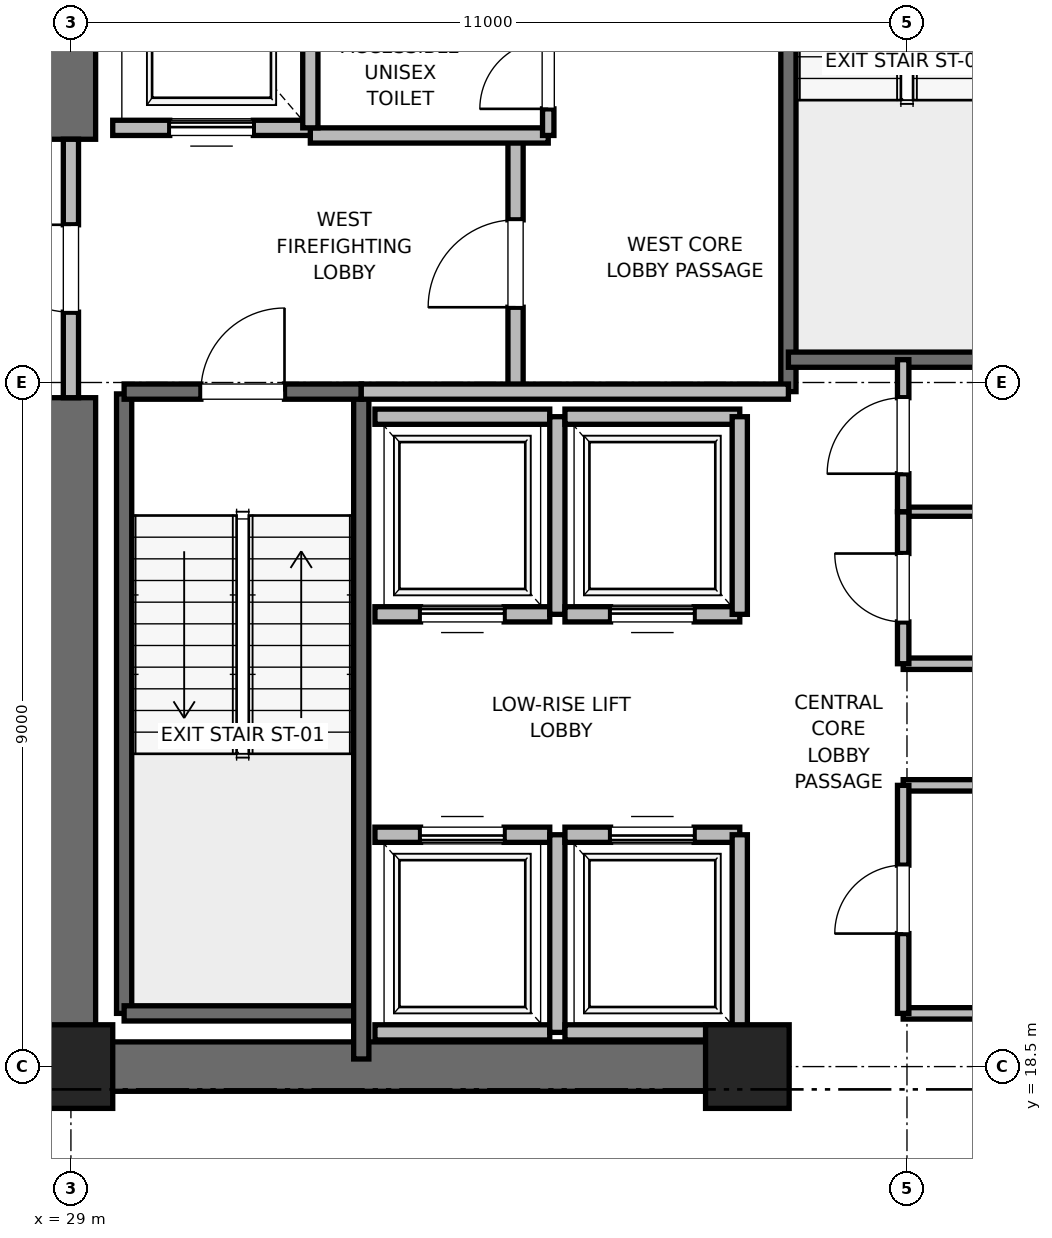
"""IFC4 building model, lengths in metres.
Left out: names, types, materials, properties, quantities, classifications, styles, units other than length and angle.
Written with IfcOpenShell. Run it as: python <this file> out.ifc"""

import sys

from ifc_helpers import new_model, si_unit, direction, frame, frame_2d, origin, origin_2d, place, context, subcontext, project, spatial, rectangle, extrude, element, fill, save


model = new_model("IFC4")
c1 = context("Model", 3, precision=1e-05, world=origin(), true_north=direction((0.0, 1.0)))
c2 = subcontext(c1, "Body", "Model", "MODEL_VIEW")
j1 = project(units=[si_unit("LENGTHUNIT", "METRE"), si_unit("PLANEANGLEUNIT", "RADIAN")], contexts=[c1])
p1 = place(None, origin())
s1 = spatial("IfcSite", under=j1, at=p1, CompositionType="ELEMENT")
p2 = place(p1, origin())
s2 = spatial("IfcBuilding", under=s1, at=p2, CompositionType="ELEMENT")
p3 = place(p2, frame((0.0, 0.0, 27.6)))
s3 = spatial("IfcBuildingStorey", under=s2, at=p3, CompositionType="ELEMENT", Elevation=27.6)
for number, where, z_axis, x_axis in (
    (1, (29.0, 18.5, 0.0), (0.0, 0.0, 1.0), (1.0, 0.0, 0.0)),
    (2, (37.9, 18.5, 0.0), (0.0, 0.0, 1.0), (1.0, 0.0, 0.0)),
):
    element("IfcColumn", number, at=place(p3, frame(where, z_axis=z_axis, x_axis=x_axis)), inside=s3, PredefinedType="PILASTER", context=c2, shape_type="SweptSolid", body=[
        extrude(rectangle(XDim=1.1, YDim=1.1, at=origin_2d()), origin(), (0.0, 0.0, 1.0), 4.0),
    ])
p4 = place(p3, frame((29.0, 18.5, 0.0), z_axis=(0.0, 0.0, 1.0), x_axis=(1.0, 0.0, 0.0)))
e3 = element("IfcWall", 3, at=p4, inside=s3, PredefinedType="SHEAR", context=c2, shape_type="SweptSolid", body=[
    extrude(rectangle(XDim=9.2, YDim=0.65, at=frame_2d((4.6, 0.0))), origin(), (0.0, 0.0, 1.0), 3.76),
])
p5 = place(p3, frame((29.0, 18.5, 0.0), z_axis=(0.0, 0.0, 1.0), x_axis=(0.0, 1.0, 0.0)))
e4 = element("IfcWall", 4, at=p5, inside=s3, PredefinedType="SHEAR", context=c2, shape_type="SweptSolid", body=[
    extrude(rectangle(XDim=8.8, YDim=0.65, at=frame_2d((4.4, 0.0))), origin(), (0.0, 0.0, 1.0), 3.76),
])
p6 = place(p3, frame((29.0, 30.7, 0.0), z_axis=(0.0, 0.0, 1.0), x_axis=(0.0, 1.0, 0.0)))
e5 = element("IfcWall", 5, at=p6, inside=s3, PredefinedType="SHEAR", context=c2, shape_type="SweptSolid", body=[
    extrude(rectangle(XDim=5.8, YDim=0.65, at=frame_2d((2.9, 0.0))), origin(), (0.0, 0.0, 1.0), 3.76),
])
p7 = place(p3, frame((29.7, 19.2, 0.0), z_axis=(0.0, 0.0, 1.0), x_axis=(0.0, 1.0, 0.0)))
e6 = element("IfcWall", 6, at=p7, inside=s3, PredefinedType="SOLIDWALL", context=c2, shape_type="SweptSolid", body=[
    extrude(rectangle(XDim=8.15, YDim=0.2, at=frame_2d((4.075, 0.0))), origin(), (0.0, 0.0, 1.0), 3.76),
])
p8 = place(p3, frame((29.7, 19.2, 0.0), z_axis=(0.0, 0.0, 1.0), x_axis=(1.0, 0.0, 0.0)))
e7 = element("IfcWall", 7, at=p8, inside=s3, PredefinedType="SOLIDWALL", context=c2, shape_type="SweptSolid", body=[
    extrude(rectangle(XDim=3.12, YDim=0.2, at=frame_2d((1.56, 0.0))), origin(), (0.0, 0.0, 1.0), 3.76),
])
p9 = place(p3, frame((32.82, 18.6, 0.0), z_axis=(0.0, 0.0, 1.0), x_axis=(0.0, 1.0, 0.0)))
e8 = element("IfcWall", 8, at=p9, inside=s3, PredefinedType="SOLIDWALL", context=c2, shape_type="SweptSolid", body=[
    extrude(rectangle(XDim=8.78, YDim=0.2, at=frame_2d((4.39, 0.0))), origin(), (0.0, 0.0, 1.0), 3.76),
])
p10 = place(p3, frame((29.7, 27.38, 0.0), z_axis=(0.0, 0.0, 1.0), x_axis=(1.0, 0.0, 0.0)))
e9 = element("IfcWall", 9, at=p10, inside=s3, PredefinedType="SOLIDWALL", context=c2, shape_type="SweptSolid", body=[
    extrude(rectangle(XDim=3.12, YDim=0.2, at=frame_2d((1.56, 0.0))), origin(), (0.0, 0.0, 1.0), 3.76),
])
p11 = place(p10, frame((1.01, 0.0, 0.0)))
e10 = element("IfcOpeningElement", 10, at=p11, cuts=e9, PredefinedType="OPENING", context=c2, shape_type="SweptSolid", body=[
    extrude(rectangle(XDim=1.1, YDim=2.15, at=frame_2d((0.55, 1.075))), frame((0.0, 0.1, 0.0), z_axis=(0.0, -1.0, 0.0), x_axis=(1.0, 0.0, 0.0)), (0.0, 0.0, 1.0), 0.2),
])
p12 = place(p3, frame((38.44, 27.38, 0.0), z_axis=(0.0, 0.0, 1.0), x_axis=(0.0, 1.0, 0.0)))
e11 = element("IfcWall", 11, at=p12, inside=s3, PredefinedType="SOLIDWALL", context=c2, shape_type="SweptSolid", body=[
    extrude(rectangle(XDim=8.87, YDim=0.2, at=frame_2d((4.435, 0.0))), origin(), (0.0, 0.0, 1.0), 3.76),
])
p13 = place(p3, frame((38.44, 27.8, 0.0), z_axis=(0.0, 0.0, 1.0), x_axis=(1.0, 0.0, 0.0)))
e12 = element("IfcWall", 12, at=p13, inside=s3, PredefinedType="SOLIDWALL", context=c2, shape_type="SweptSolid", body=[
    extrude(rectangle(XDim=3.32, YDim=0.2, at=frame_2d((1.66, 0.0))), origin(), (0.0, 0.0, 1.0), 3.76),
])
p14 = place(p3, frame((34.85, 27.38, 0.0), z_axis=(0.0, 0.0, 1.0), x_axis=(0.0, 1.0, 0.0)))
e13 = element("IfcWall", 13, at=p14, inside=s3, PredefinedType="PARTITIONING", context=c2, shape_type="SweptSolid", body=[
    extrude(rectangle(XDim=3.37, YDim=0.2, at=frame_2d((1.685, 0.0))), origin(), (0.0, 0.0, 1.0), 3.76),
])
p15 = place(p14, frame((1.11, 0.0, 0.0)))
e14 = element("IfcOpeningElement", 14, at=p15, cuts=e13, PredefinedType="OPENING", context=c2, shape_type="SweptSolid", body=[
    extrude(rectangle(XDim=1.15, YDim=2.2, at=frame_2d((0.575, 1.1))), frame((0.0, 0.1, 0.0), z_axis=(0.0, -1.0, 0.0), x_axis=(1.0, 0.0, 0.0)), (0.0, 0.0, 1.0), 0.2),
])
p16 = place(p3, frame((29.0, 27.3, 0.0), z_axis=(0.0, 0.0, 1.0), x_axis=(0.0, 1.0, 0.0)))
e15 = element("IfcWall", 15, at=p16, inside=s3, PredefinedType="PARTITIONING", context=c2, shape_type="SweptSolid", body=[
    extrude(rectangle(XDim=3.4, YDim=0.2, at=frame_2d((1.7, 0.0))), origin(), (0.0, 0.0, 1.0), 2.54),
])
p17 = place(p16, frame((1.125, 0.0, 0.0)))
e16 = element("IfcOpeningElement", 16, at=p17, cuts=e15, PredefinedType="OPENING", context=c2, shape_type="SweptSolid", body=[
    extrude(rectangle(XDim=1.15, YDim=2.2, at=frame_2d((0.575, 1.1))), frame((0.0, 0.1, 0.0), z_axis=(0.0, -1.0, 0.0), x_axis=(1.0, 0.0, 0.0)), (0.0, 0.0, 1.0), 0.2),
])
p18 = place(p3, frame((32.82, 27.38, 0.0), z_axis=(0.0, 0.0, 1.0), x_axis=(1.0, 0.0, 0.0)))
e17 = element("IfcWall", 17, at=p18, inside=s3, PredefinedType="PARTITIONING", context=c2, shape_type="SweptSolid", body=[
    extrude(rectangle(XDim=5.62, YDim=0.2, at=frame_2d((2.81, 0.0))), origin(), (0.0, 0.0, 1.0), 3.76),
])
p19 = place(p3, frame((32.15, 30.75, 0.0), z_axis=(0.0, 0.0, 1.0), x_axis=(1.0, 0.0, 0.0)))
e18 = element("IfcWall", 18, at=p19, inside=s3, PredefinedType="PARTITIONING", context=c2, shape_type="SweptSolid", body=[
    extrude(rectangle(XDim=3.13, YDim=0.2, at=frame_2d((1.565, 0.0))), origin(), (0.0, 0.0, 1.0), 3.76),
])
p20 = place(p3, frame((29.55, 30.85, 0.0), z_axis=(0.0, 0.0, 1.0), x_axis=(1.0, 0.0, 0.0)))
e19 = element("IfcWall", 19, at=p20, inside=s3, PredefinedType="SOLIDWALL", context=c2, shape_type="SweptSolid", body=[
    extrude(rectangle(XDim=2.6, YDim=0.2, at=frame_2d((1.3, 0.0))), origin(), (0.0, 0.0, 1.0), 2.54),
])
p21 = place(p20, frame((0.75, 0.0, 0.0)))
e20 = element("IfcOpeningElement", 20, at=p21, cuts=e19, PredefinedType="OPENING", context=c2, shape_type="SweptSolid", body=[
    extrude(rectangle(XDim=1.1, YDim=2.2, at=frame_2d((0.55, 1.1))), frame((0.0, 0.1, 0.0), z_axis=(0.0, -1.0, 0.0), x_axis=(1.0, 0.0, 0.0)), (0.0, 0.0, 1.0), 0.2),
])
p22 = place(p3, frame((32.15, 30.85, 0.0), z_axis=(0.0, 0.0, 1.0), x_axis=(0.0, 1.0, 0.0)))
e21 = element("IfcWall", 21, at=p22, inside=s3, PredefinedType="SOLIDWALL", context=c2, shape_type="SweptSolid", body=[
    extrude(rectangle(XDim=3.0, YDim=0.2, at=frame_2d((1.5, 0.0))), origin(), (0.0, 0.0, 1.0), 3.76),
])
p23 = place(p3, frame((33.0, 18.95, 0.0), z_axis=(0.0, 0.0, 1.0), x_axis=(1.0, 0.0, 0.0)))
e22 = element("IfcWall", 22, at=p23, inside=s3, PredefinedType="SOLIDWALL", context=c2, shape_type="SweptSolid", body=[
    extrude(rectangle(XDim=2.3, YDim=0.2, at=frame_2d((1.15, 0.0))), origin(), (0.0, 0.0, 1.0), 3.76),
])
p24 = place(p3, frame((35.3, 21.55, 0.0), z_axis=(0.0, 0.0, 1.0), x_axis=(-1.0, 0.0, 0.0)))
e23 = element("IfcWall", 23, at=p24, inside=s3, PredefinedType="SOLIDWALL", context=c2, shape_type="SweptSolid", body=[
    extrude(rectangle(XDim=2.3, YDim=0.2, at=frame_2d((1.15, 0.0))), origin(), (0.0, 0.0, 1.0), 3.76),
])
p25 = place(p24, frame((0.6, 0.0, 0.0)))
e24 = element("IfcOpeningElement", 24, at=p25, cuts=e23, PredefinedType="OPENING", context=c2, shape_type="SweptSolid", body=[
    extrude(rectangle(XDim=1.1, YDim=2.2, at=frame_2d((0.55, 1.1))), frame((0.0, 0.1, 0.0), z_axis=(0.0, -1.0, 0.0), x_axis=(1.0, 0.0, 0.0)), (0.0, 0.0, 1.0), 0.2),
])
p26 = place(p3, frame((35.4, 18.95, 0.0), z_axis=(0.0, 0.0, 1.0), x_axis=(0.0, 1.0, 0.0)))
e25 = element("IfcWall", 25, at=p26, inside=s3, PredefinedType="SOLIDWALL", context=c2, shape_type="SweptSolid", body=[
    extrude(rectangle(XDim=2.6, YDim=0.2, at=frame_2d((1.3, 0.0))), origin(), (0.0, 0.0, 1.0), 3.76),
])
p27 = place(p3, frame((35.5, 18.95, 0.0), z_axis=(0.0, 0.0, 1.0), x_axis=(1.0, 0.0, 0.0)))
e26 = element("IfcWall", 26, at=p27, inside=s3, PredefinedType="SOLIDWALL", context=c2, shape_type="SweptSolid", body=[
    extrude(rectangle(XDim=2.3, YDim=0.2, at=frame_2d((1.15, 0.0))), origin(), (0.0, 0.0, 1.0), 2.54),
])
p28 = place(p3, frame((37.8, 21.55, 0.0), z_axis=(0.0, 0.0, 1.0), x_axis=(-1.0, 0.0, 0.0)))
e27 = element("IfcWall", 27, at=p28, inside=s3, PredefinedType="SOLIDWALL", context=c2, shape_type="SweptSolid", body=[
    extrude(rectangle(XDim=2.3, YDim=0.2, at=frame_2d((1.15, 0.0))), origin(), (0.0, 0.0, 1.0), 3.76),
])
p29 = place(p28, frame((0.6, 0.0, 0.0)))
e28 = element("IfcOpeningElement", 28, at=p29, cuts=e27, PredefinedType="OPENING", context=c2, shape_type="SweptSolid", body=[
    extrude(rectangle(XDim=1.1, YDim=2.2, at=frame_2d((0.55, 1.1))), frame((0.0, 0.1, 0.0), z_axis=(0.0, -1.0, 0.0), x_axis=(1.0, 0.0, 0.0)), (0.0, 0.0, 1.0), 0.2),
])
p30 = place(p3, frame((37.8, 18.95, 0.0), z_axis=(0.0, 0.0, 1.0), x_axis=(0.0, 1.0, 0.0)))
e29 = element("IfcWall", 29, at=p30, inside=s3, PredefinedType="SOLIDWALL", context=c2, shape_type="SweptSolid", body=[
    extrude(rectangle(XDim=2.6, YDim=0.2, at=frame_2d((1.3, 0.0))), origin(), (0.0, 0.0, 1.0), 2.54),
])
p31 = place(p3, frame((33.0, 24.45, 0.0), z_axis=(0.0, 0.0, 1.0), x_axis=(1.0, 0.0, 0.0)))
e30 = element("IfcWall", 30, at=p31, inside=s3, PredefinedType="SOLIDWALL", context=c2, shape_type="SweptSolid", body=[
    extrude(rectangle(XDim=2.3, YDim=0.2, at=frame_2d((1.15, 0.0))), origin(), (0.0, 0.0, 1.0), 3.76),
])
p32 = place(p31, frame((0.6, 0.0, 0.0)))
e31 = element("IfcOpeningElement", 31, at=p32, cuts=e30, PredefinedType="OPENING", context=c2, shape_type="SweptSolid", body=[
    extrude(rectangle(XDim=1.1, YDim=2.2, at=frame_2d((0.55, 1.1))), frame((0.0, 0.1, 0.0), z_axis=(0.0, -1.0, 0.0), x_axis=(1.0, 0.0, 0.0)), (0.0, 0.0, 1.0), 0.2),
])
p33 = place(p3, frame((35.3, 27.05, 0.0), z_axis=(0.0, 0.0, 1.0), x_axis=(-1.0, 0.0, 0.0)))
e32 = element("IfcWall", 32, at=p33, inside=s3, PredefinedType="SOLIDWALL", context=c2, shape_type="SweptSolid", body=[
    extrude(rectangle(XDim=2.3, YDim=0.2, at=frame_2d((1.15, 0.0))), origin(), (0.0, 0.0, 1.0), 3.76),
])
p34 = place(p3, frame((35.4, 24.45, 0.0), z_axis=(0.0, 0.0, 1.0), x_axis=(0.0, 1.0, 0.0)))
e33 = element("IfcWall", 33, at=p34, inside=s3, PredefinedType="SOLIDWALL", context=c2, shape_type="SweptSolid", body=[
    extrude(rectangle(XDim=2.6, YDim=0.2, at=frame_2d((1.3, 0.0))), origin(), (0.0, 0.0, 1.0), 3.76),
])
p35 = place(p3, frame((35.5, 24.45, 0.0), z_axis=(0.0, 0.0, 1.0), x_axis=(1.0, 0.0, 0.0)))
e34 = element("IfcWall", 34, at=p35, inside=s3, PredefinedType="SOLIDWALL", context=c2, shape_type="SweptSolid", body=[
    extrude(rectangle(XDim=2.3, YDim=0.2, at=frame_2d((1.15, 0.0))), origin(), (0.0, 0.0, 1.0), 3.76),
])
p36 = place(p35, frame((0.6, 0.0, 0.0)))
e35 = element("IfcOpeningElement", 35, at=p36, cuts=e34, PredefinedType="OPENING", context=c2, shape_type="SweptSolid", body=[
    extrude(rectangle(XDim=1.1, YDim=2.2, at=frame_2d((0.55, 1.1))), frame((0.0, 0.1, 0.0), z_axis=(0.0, -1.0, 0.0), x_axis=(1.0, 0.0, 0.0)), (0.0, 0.0, 1.0), 0.2),
])
p37 = place(p3, frame((37.8, 27.05, 0.0), z_axis=(0.0, 0.0, 1.0), x_axis=(-1.0, 0.0, 0.0)))
e36 = element("IfcWall", 36, at=p37, inside=s3, PredefinedType="SOLIDWALL", context=c2, shape_type="SweptSolid", body=[
    extrude(rectangle(XDim=2.3, YDim=0.2, at=frame_2d((1.15, 0.0))), origin(), (0.0, 0.0, 1.0), 3.76),
])
p38 = place(p3, frame((37.8, 24.45, 0.0), z_axis=(0.0, 0.0, 1.0), x_axis=(0.0, 1.0, 0.0)))
e37 = element("IfcWall", 37, at=p38, inside=s3, PredefinedType="SOLIDWALL", context=c2, shape_type="SweptSolid", body=[
    extrude(rectangle(XDim=2.6, YDim=0.2, at=frame_2d((1.3, 0.0))), origin(), (0.0, 0.0, 1.0), 3.76),
])
for number, where, z_axis, x_axis in (
    (38, (39.95, 19.2, 0.0), (0.0, 0.0, 1.0), (1.0, 0.0, 0.0)),
    (39, (39.95, 22.2, 0.0), (0.0, 0.0, 1.0), (1.0, 0.0, 0.0)),
    (40, (39.95, 23.8, 0.0), (0.0, 0.0, 1.0), (1.0, 0.0, 0.0)),
):
    element("IfcWall", number, at=place(p3, frame(where, z_axis=z_axis, x_axis=x_axis)), inside=s3, PredefinedType="PARTITIONING", context=c2, shape_type="SweptSolid", body=[
        extrude(rectangle(XDim=1.81, YDim=0.15, at=frame_2d((0.905, 0.0))), origin(), (0.0, 0.0, 1.0), 2.85),
    ])
p39 = place(p3, frame((39.95, 25.8, 0.0), z_axis=(0.0, 0.0, 1.0), x_axis=(1.0, 0.0, 0.0)))
e41 = element("IfcWall", 41, at=p39, inside=s3, PredefinedType="PARTITIONING", context=c2, shape_type="SweptSolid", body=[
    extrude(rectangle(XDim=1.81, YDim=0.12, at=frame_2d((0.905, 0.0))), origin(), (0.0, 0.0, 1.0), 2.85),
])
p40 = place(p3, frame((39.95, 19.2, 0.0), z_axis=(0.0, 0.0, 1.0), x_axis=(0.0, 1.0, 0.0)))
e42 = element("IfcWall", 42, at=p40, inside=s3, PredefinedType="PARTITIONING", context=c2, shape_type="SweptSolid", body=[
    extrude(rectangle(XDim=3.0, YDim=0.15, at=frame_2d((1.5, 0.0))), origin(), (0.0, 0.0, 1.0), 2.85),
])
p41 = place(p40, frame((1.05, 0.0, 0.0)))
e43 = element("IfcOpeningElement", 43, at=p41, cuts=e42, PredefinedType="OPENING", context=c2, shape_type="SweptSolid", body=[
    extrude(rectangle(XDim=0.9, YDim=2.1, at=frame_2d((0.45, 1.05))), frame((0.0, 0.075, 0.0), z_axis=(0.0, -1.0, 0.0), x_axis=(1.0, 0.0, 0.0)), (0.0, 0.0, 1.0), 0.15),
])
p42 = place(p3, frame((39.95, 23.8, 0.0), z_axis=(0.0, 0.0, 1.0), x_axis=(0.0, 1.0, 0.0)))
e44 = element("IfcWall", 44, at=p42, inside=s3, PredefinedType="PARTITIONING", context=c2, shape_type="SweptSolid", body=[
    extrude(rectangle(XDim=2.0, YDim=0.15, at=frame_2d((1.0, 0.0))), origin(), (0.0, 0.0, 1.0), 2.85),
])
p43 = place(p42, frame((0.55, 0.0, 0.0)))
e45 = element("IfcOpeningElement", 45, at=p43, cuts=e44, PredefinedType="OPENING", context=c2, shape_type="SweptSolid", body=[
    extrude(rectangle(XDim=0.9, YDim=2.1, at=frame_2d((0.45, 1.05))), frame((0.0, 0.075, 0.0), z_axis=(0.0, -1.0, 0.0), x_axis=(1.0, 0.0, 0.0)), (0.0, 0.0, 1.0), 0.15),
])
p44 = place(p3, frame((39.95, 25.8, 0.0), z_axis=(0.0, 0.0, 1.0), x_axis=(0.0, 1.0, 0.0)))
e46 = element("IfcWall", 46, at=p44, inside=s3, PredefinedType="PARTITIONING", context=c2, shape_type="SweptSolid", body=[
    extrude(rectangle(XDim=2.0, YDim=0.15, at=frame_2d((1.0, 0.0))), origin(), (0.0, 0.0, 1.0), 2.85),
])
p45 = place(p44, frame((0.5, 0.0, 0.0)))
e47 = element("IfcOpeningElement", 47, at=p45, cuts=e46, PredefinedType="OPENING", context=c2, shape_type="SweptSolid", body=[
    extrude(rectangle(XDim=1.0, YDim=2.15, at=frame_2d((0.5, 1.075))), frame((0.0, 0.075, 0.0), z_axis=(0.0, -1.0, 0.0), x_axis=(1.0, 0.0, 0.0)), (0.0, 0.0, 1.0), 0.15),
])
p46 = place(p3, frame((35.28, 30.75, 0.0), z_axis=(0.0, 0.0, 1.0), x_axis=(0.0, 1.0, 0.0)))
e48 = element("IfcWall", 48, at=p46, inside=s3, PredefinedType="PARTITIONING", context=c2, shape_type="SweptSolid", body=[
    extrude(rectangle(XDim=1.6, YDim=0.15, at=frame_2d((0.8, 0.0))), origin(), (0.0, 0.0, 1.0), 2.85),
])
p47 = place(p46, frame((0.35, 0.0, 0.0)))
e49 = element("IfcOpeningElement", 49, at=p47, cuts=e48, PredefinedType="OPENING", context=c2, shape_type="SweptSolid", body=[
    extrude(rectangle(XDim=0.9, YDim=2.1, at=frame_2d((0.45, 1.05))), frame((0.0, 0.075, 0.0), z_axis=(0.0, -1.0, 0.0), x_axis=(1.0, 0.0, 0.0)), (0.0, 0.0, 1.0), 0.15),
])
p48 = place(p11, origin())
e50 = element("IfcDoor", 50, at=p48, inside=s3, OperationType="SINGLE_SWING_RIGHT", PredefinedType="DOOR", context=c2, shape_type="SweptSolid", body=[
    extrude(rectangle(XDim=1.1, YDim=2.15, at=frame_2d((0.55, 1.075))), frame((0.0, 0.025, 0.0), z_axis=(0.0, -1.0, 0.0), x_axis=(1.0, 0.0, 0.0)), (0.0, 0.0, 1.0), 0.05),
])
fill(e10, e50)
p49 = place(p15, origin())
e51 = element("IfcDoor", 51, at=p49, inside=s3, OperationType="SINGLE_SWING_LEFT", PredefinedType="DOOR", context=c2, shape_type="SweptSolid", body=[
    extrude(rectangle(XDim=1.15, YDim=2.2, at=frame_2d((0.575, 1.1))), frame((0.0, 0.025, 0.0), z_axis=(0.0, -1.0, 0.0), x_axis=(1.0, 0.0, 0.0)), (0.0, 0.0, 1.0), 0.05),
])
fill(e14, e51)
p50 = place(p17, origin())
e52 = element("IfcDoor", 52, at=p50, inside=s3, OperationType="SINGLE_SWING_RIGHT", PredefinedType="DOOR", context=c2, shape_type="SweptSolid", body=[
    extrude(rectangle(XDim=1.15, YDim=2.2, at=frame_2d((0.575, 1.1))), frame((0.0, 0.025, 0.0), z_axis=(0.0, -1.0, 0.0), x_axis=(1.0, 0.0, 0.0)), (0.0, 0.0, 1.0), 0.05),
])
fill(e16, e52)
p51 = place(p21, origin())
e53 = element("IfcDoor", 53, at=p51, inside=s3, OperationType="SLIDING_TO_RIGHT", PredefinedType="DOOR", context=c2, shape_type="SweptSolid", body=[
    extrude(rectangle(XDim=1.1, YDim=2.2, at=frame_2d((0.55, 1.1))), frame((0.0, 0.025, 0.0), z_axis=(0.0, -1.0, 0.0), x_axis=(1.0, 0.0, 0.0)), (0.0, 0.0, 1.0), 0.05),
])
fill(e20, e53)
p52 = place(p25, origin())
e54 = element("IfcDoor", 54, at=p52, inside=s3, OperationType="SLIDING_TO_RIGHT", PredefinedType="DOOR", context=c2, shape_type="SweptSolid", body=[
    extrude(rectangle(XDim=1.1, YDim=2.2, at=frame_2d((0.55, 1.1))), frame((0.0, 0.025, 0.0), z_axis=(0.0, -1.0, 0.0), x_axis=(1.0, 0.0, 0.0)), (0.0, 0.0, 1.0), 0.05),
])
fill(e24, e54)
p53 = place(p29, origin())
e55 = element("IfcDoor", 55, at=p53, inside=s3, OperationType="SLIDING_TO_RIGHT", PredefinedType="DOOR", context=c2, shape_type="SweptSolid", body=[
    extrude(rectangle(XDim=1.1, YDim=2.2, at=frame_2d((0.55, 1.1))), frame((0.0, 0.025, 0.0), z_axis=(0.0, -1.0, 0.0), x_axis=(1.0, 0.0, 0.0)), (0.0, 0.0, 1.0), 0.05),
])
fill(e28, e55)
p54 = place(p32, origin())
e56 = element("IfcDoor", 56, at=p54, inside=s3, OperationType="SLIDING_TO_RIGHT", PredefinedType="DOOR", context=c2, shape_type="SweptSolid", body=[
    extrude(rectangle(XDim=1.1, YDim=2.2, at=frame_2d((0.55, 1.1))), frame((0.0, 0.025, 0.0), z_axis=(0.0, -1.0, 0.0), x_axis=(1.0, 0.0, 0.0)), (0.0, 0.0, 1.0), 0.05),
])
fill(e31, e56)
p55 = place(p36, origin())
e57 = element("IfcDoor", 57, at=p55, inside=s3, OperationType="SLIDING_TO_RIGHT", PredefinedType="DOOR", context=c2, shape_type="SweptSolid", body=[
    extrude(rectangle(XDim=1.1, YDim=2.2, at=frame_2d((0.55, 1.1))), frame((0.0, 0.025, 0.0), z_axis=(0.0, -1.0, 0.0), x_axis=(1.0, 0.0, 0.0)), (0.0, 0.0, 1.0), 0.05),
])
fill(e35, e57)
p56 = place(p41, origin())
e58 = element("IfcDoor", 58, at=p56, inside=s3, OperationType="SINGLE_SWING_LEFT", PredefinedType="DOOR", context=c2, shape_type="SweptSolid", body=[
    extrude(rectangle(XDim=0.9, YDim=2.1, at=frame_2d((0.45, 1.05))), frame((0.0, 0.025, 0.0), z_axis=(0.0, -1.0, 0.0), x_axis=(1.0, 0.0, 0.0)), (0.0, 0.0, 1.0), 0.05),
])
fill(e43, e58)
p57 = place(p43, origin())
e59 = element("IfcDoor", 59, at=p57, inside=s3, OperationType="SINGLE_SWING_RIGHT", PredefinedType="DOOR", context=c2, shape_type="SweptSolid", body=[
    extrude(rectangle(XDim=0.9, YDim=2.1, at=frame_2d((0.45, 1.05))), frame((0.0, 0.025, 0.0), z_axis=(0.0, -1.0, 0.0), x_axis=(1.0, 0.0, 0.0)), (0.0, 0.0, 1.0), 0.05),
])
fill(e45, e59)
p58 = place(p45, origin())
e60 = element("IfcDoor", 60, at=p58, inside=s3, OperationType="SINGLE_SWING_LEFT", PredefinedType="DOOR", context=c2, shape_type="SweptSolid", body=[
    extrude(rectangle(XDim=1.0, YDim=2.15, at=frame_2d((0.5, 1.075))), frame((0.0, 0.025, 0.0), z_axis=(0.0, -1.0, 0.0), x_axis=(1.0, 0.0, 0.0)), (0.0, 0.0, 1.0), 0.05),
])
fill(e47, e60)
p59 = place(p47, origin())
e61 = element("IfcDoor", 61, at=p59, inside=s3, OperationType="SINGLE_SWING_LEFT", PredefinedType="DOOR", context=c2, shape_type="SweptSolid", body=[
    extrude(rectangle(XDim=0.9, YDim=2.1, at=frame_2d((0.45, 1.05))), frame((0.0, 0.025, 0.0), z_axis=(0.0, -1.0, 0.0), x_axis=(1.0, 0.0, 0.0)), (0.0, 0.0, 1.0), 0.05),
])
fill(e49, e61)
save(model, sys.argv[1])
